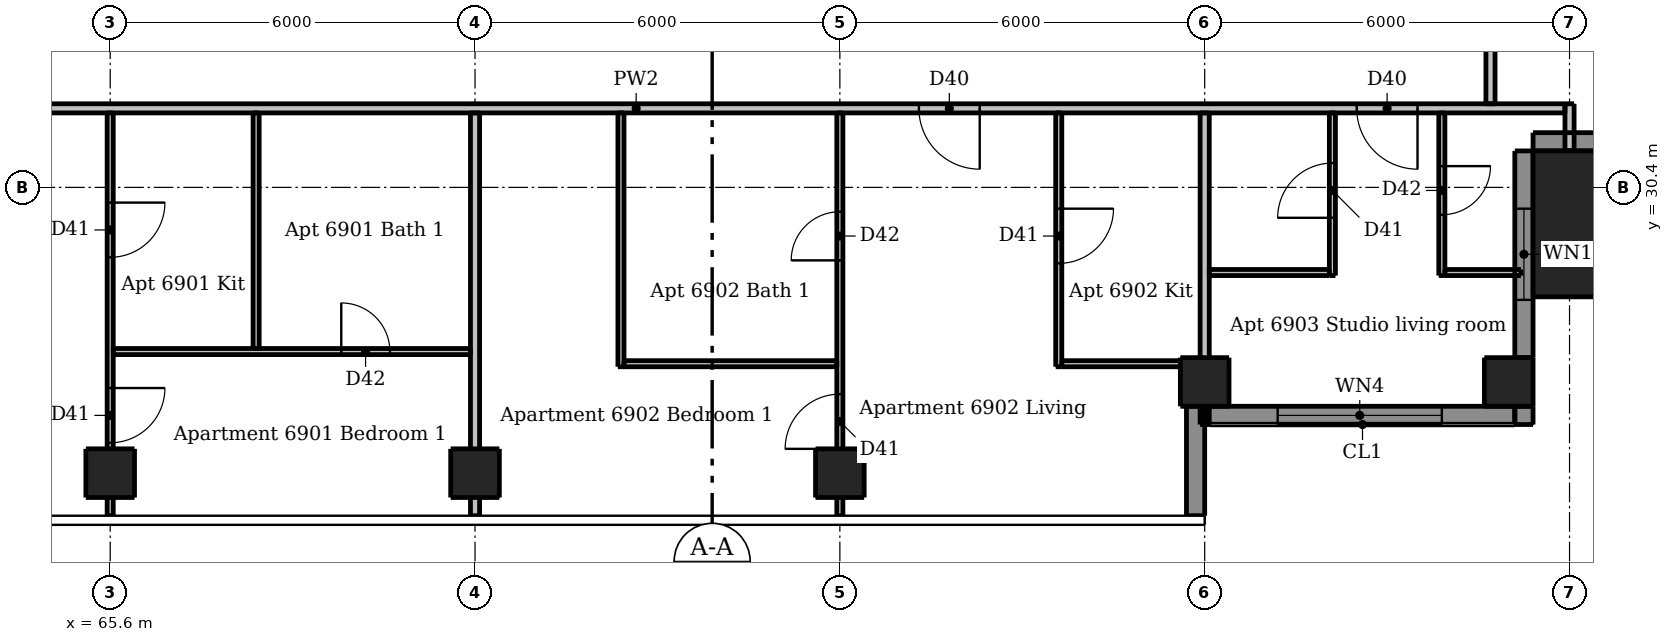
"""IFC4 building model, lengths in metres.
Left out: names, types, materials, properties, quantities, classifications, styles, units other than length and angle.
Written with IfcOpenShell. Run it as: python <this file> out.ifc"""

import sys

from ifc_helpers import new_model, si_unit, direction, frame, frame_2d, origin, origin_2d, place, context, subcontext, project, spatial, rectangle, extrude, element, fill, save


model = new_model("IFC4")
c1 = context("Model", 3, precision=1e-05, world=origin(), true_north=direction((0.0, 1.0)))
c2 = subcontext(c1, "Body", "Model", "MODEL_VIEW")
j1 = project(units=[si_unit("LENGTHUNIT", "METRE"), si_unit("PLANEANGLEUNIT", "RADIAN")], contexts=[c1])
p1 = place(None, origin())
s1 = spatial("IfcSite", under=j1, at=p1, CompositionType="ELEMENT")
p2 = place(p1, origin())
s2 = spatial("IfcBuilding", under=s1, at=p2, CompositionType="ELEMENT")
p3 = place(p2, frame((0.0, 0.0, 258.7)))
s3 = spatial("IfcBuildingStorey", under=s2, at=p3, CompositionType="ELEMENT", Elevation=258.7)
for number, where, z_axis, x_axis in (
    (1, (65.6, 25.7, 0.0), (0.0, 0.0, 1.0), (1.0, 0.0, 0.0)),
    (2, (71.6, 25.7, 0.0), (0.0, 0.0, 1.0), (1.0, 0.0, 0.0)),
    (3, (77.6, 25.7, 0.0), (0.0, 0.0, 1.0), (1.0, 0.0, 0.0)),
    (4, (83.6, 27.2, 0.0), (0.0, 0.0, 1.0), (1.0, 0.0, 0.0)),
    (5, (88.6, 27.2, 0.0), (0.0, 0.0, 1.0), (1.0, 0.0, 0.0)),
):
    element("IfcColumn", number, at=place(p3, frame(where, z_axis=z_axis, x_axis=x_axis)), inside=s3, PredefinedType="COLUMN", context=c2, shape_type="SweptSolid", body=[
        extrude(rectangle(XDim=0.8, YDim=0.8, at=origin_2d()), origin(), (0.0, 0.0, 1.0), 3.05),
    ])
p4 = place(p3, frame((90.2, 29.8, 0.0), z_axis=(0.0, 0.0, 1.0), x_axis=(1.0, 0.0, 0.0)))
e6 = element("IfcColumn", 6, at=p4, inside=s3, PredefinedType="COLUMN", context=c2, shape_type="SweptSolid", body=[
    extrude(rectangle(XDim=2.4, YDim=2.4, at=origin_2d()), origin(), (0.0, 0.0, 1.0), 3.3),
])
p5 = place(p3, frame((83.45, 25.0, 0.0), z_axis=(0.0, 0.0, 1.0), x_axis=(0.0, 1.0, 0.0)))
e7 = element("IfcWall", 7, at=p5, inside=s3, PredefinedType="SOLIDWALL", context=c2, shape_type="SweptSolid", body=[
    extrude(rectangle(XDim=1.8, YDim=0.3, at=frame_2d((0.9, 0.0))), origin(), (0.0, 0.0, 1.0), 3.05),
])
p6 = place(p3, frame((88.85, 26.5, 0.0), z_axis=(0.0, 0.0, 1.0), x_axis=(0.0, 1.0, 0.0)))
e8 = element("IfcWall", 8, at=p6, inside=s3, PredefinedType="SOLIDWALL", context=c2, shape_type="SweptSolid", body=[
    extrude(rectangle(XDim=0.3, YDim=0.3, at=frame_2d((0.15, 0.0))), origin(), (0.0, 0.0, 1.0), 3.05),
])
p7 = place(p3, frame((88.85, 27.6, 0.0), z_axis=(0.0, 0.0, 1.0), x_axis=(0.0, 1.0, 0.0)))
e9 = element("IfcWall", 9, at=p7, inside=s3, PredefinedType="SOLIDWALL", context=c2, shape_type="SweptSolid", body=[
    extrude(rectangle(XDim=3.4, YDim=0.3, at=frame_2d((1.7, 0.0))), origin(), (0.0, 0.0, 1.0), 3.05),
])
p8 = place(p7, frame((0.95, 0.0, 0.9)))
e10 = element("IfcOpeningElement", 10, at=p8, cuts=e9, PredefinedType="OPENING", context=c2, shape_type="SweptSolid", body=[
    extrude(rectangle(XDim=1.5, YDim=1.5, at=frame_2d((0.75, 0.75))), frame((0.0, 0.16, 0.0), z_axis=(0.0, -1.0, 0.0), x_axis=(1.0, 0.0, 0.0)), (0.0, 0.0, 1.0), 0.32),
])
p9 = place(p3, frame((89.0, 31.15, 0.0), z_axis=(0.0, 0.0, 1.0), x_axis=(1.0, 0.0, 0.0)))
e11 = element("IfcWall", 11, at=p9, inside=s3, PredefinedType="SOLIDWALL", context=c2, shape_type="SweptSolid", body=[
    extrude(rectangle(XDim=3.4, YDim=0.3, at=frame_2d((1.7, 0.0))), origin(), (0.0, 0.0, 1.0), 3.05),
])
p10 = place(p3, frame((83.6, 26.65, 0.0), z_axis=(0.0, 0.0, 1.0), x_axis=(1.0, 0.0, 0.0)))
e12 = element("IfcWall", 12, at=p10, inside=s3, PredefinedType="SOLIDWALL", context=c2, shape_type="SweptSolid", body=[
    extrude(rectangle(XDim=5.1, YDim=0.3, at=frame_2d((2.55, 0.0))), origin(), (0.0, 0.0, 1.0), 3.05),
])
p11 = place(p10, frame((1.2, 0.0, 0.15)))
e13 = element("IfcOpeningElement", 13, at=p11, cuts=e12, PredefinedType="OPENING", context=c2, shape_type="SweptSolid", body=[
    extrude(rectangle(XDim=2.7, YDim=2.1, at=frame_2d((1.35, 1.05))), frame((0.0, 0.16, 0.0), z_axis=(0.0, -1.0, 0.0), x_axis=(1.0, 0.0, 0.0)), (0.0, 0.0, 1.0), 0.32),
])
p12 = place(p3, frame((65.6, 31.625, 0.0), z_axis=(0.0, 0.0, 1.0), x_axis=(0.0, -1.0, 0.0)))
e14 = element("IfcWall", 14, at=p12, inside=s3, PredefinedType="PARTITIONING", context=c2, shape_type="SweptSolid", body=[
    extrude(rectangle(XDim=6.625, YDim=0.1, at=frame_2d((3.312, 0.0))), origin(), (0.0, 0.0, 1.0), 2.589),
])
p13 = place(p12, frame((1.475, 0.0, 0.0)))
e15 = element("IfcOpeningElement", 15, at=p13, cuts=e14, PredefinedType="OPENING", context=c2, shape_type="SweptSolid", body=[
    extrude(rectangle(XDim=0.9, YDim=2.1, at=frame_2d((0.45, 1.05))), frame((0.0, 0.06, 0.0), z_axis=(0.0, -1.0, 0.0), x_axis=(1.0, 0.0, 0.0)), (0.0, 0.0, 1.0), 0.12),
])
p14 = place(p12, frame((4.525, 0.0, 0.0)))
e16 = element("IfcOpeningElement", 16, at=p14, cuts=e14, PredefinedType="OPENING", context=c2, shape_type="SweptSolid", body=[
    extrude(rectangle(XDim=0.9, YDim=2.1, at=frame_2d((0.45, 1.05))), frame((0.0, 0.06, 0.0), z_axis=(0.0, -1.0, 0.0), x_axis=(1.0, 0.0, 0.0)), (0.0, 0.0, 1.0), 0.12),
])
p15 = place(p3, frame((68.0, 27.75, 0.0), z_axis=(0.0, 0.0, 1.0), x_axis=(0.0, 1.0, 0.0)))
e17 = element("IfcWall", 17, at=p15, inside=s3, PredefinedType="PARTITIONING", context=c2, shape_type="SweptSolid", body=[
    extrude(rectangle(XDim=3.875, YDim=0.1, at=frame_2d((1.938, 0.0))), origin(), (0.0, 0.0, 1.0), 3.05),
])
p16 = place(p3, frame((74.0, 27.45, 0.0), z_axis=(0.0, 0.0, 1.0), x_axis=(0.0, 1.0, 0.0)))
e18 = element("IfcWall", 18, at=p16, inside=s3, PredefinedType="PARTITIONING", context=c2, shape_type="SweptSolid", body=[
    extrude(rectangle(XDim=4.175, YDim=0.1, at=frame_2d((2.087, 0.0))), origin(), (0.0, 0.0, 1.0), 3.05),
])
p17 = place(p3, frame((77.6, 25.0, 0.0), z_axis=(0.0, 0.0, 1.0), x_axis=(0.0, 1.0, 0.0)))
e19 = element("IfcWall", 19, at=p17, inside=s3, PredefinedType="PARTITIONING", context=c2, shape_type="SweptSolid", body=[
    extrude(rectangle(XDim=6.625, YDim=0.1, at=frame_2d((3.312, 0.0))), origin(), (0.0, 0.0, 1.0), 2.589),
])
p18 = place(p17, frame((1.1, 0.0, 0.0)))
e20 = element("IfcOpeningElement", 20, at=p18, cuts=e19, PredefinedType="OPENING", context=c2, shape_type="SweptSolid", body=[
    extrude(rectangle(XDim=0.9, YDim=2.1, at=frame_2d((0.45, 1.05))), frame((0.0, 0.06, 0.0), z_axis=(0.0, -1.0, 0.0), x_axis=(1.0, 0.0, 0.0)), (0.0, 0.0, 1.0), 0.12),
])
p19 = place(p17, frame((4.2, 0.0, 0.0)))
e21 = element("IfcOpeningElement", 21, at=p19, cuts=e19, PredefinedType="OPENING", context=c2, shape_type="SweptSolid", body=[
    extrude(rectangle(XDim=0.8, YDim=2.1, at=frame_2d((0.4, 1.05))), frame((0.0, 0.06, 0.0), z_axis=(0.0, -1.0, 0.0), x_axis=(1.0, 0.0, 0.0)), (0.0, 0.0, 1.0), 0.12),
])
p20 = place(p3, frame((81.2, 31.625, 0.0), z_axis=(0.0, 0.0, 1.0), x_axis=(0.0, -1.0, 0.0)))
e22 = element("IfcWall", 22, at=p20, inside=s3, PredefinedType="PARTITIONING", context=c2, shape_type="SweptSolid", body=[
    extrude(rectangle(XDim=4.175, YDim=0.1, at=frame_2d((2.087, 0.0))), origin(), (0.0, 0.0, 1.0), 3.05),
])
p21 = place(p20, frame((1.575, 0.0, 0.0)))
e23 = element("IfcOpeningElement", 23, at=p21, cuts=e22, PredefinedType="OPENING", context=c2, shape_type="SweptSolid", body=[
    extrude(rectangle(XDim=0.9, YDim=2.1, at=frame_2d((0.45, 1.05))), frame((0.0, 0.06, 0.0), z_axis=(0.0, -1.0, 0.0), x_axis=(1.0, 0.0, 0.0)), (0.0, 0.0, 1.0), 0.12),
])
p22 = place(p3, frame((85.7, 28.95, 0.0), z_axis=(0.0, 0.0, 1.0), x_axis=(0.0, 1.0, 0.0)))
e24 = element("IfcWall", 24, at=p22, inside=s3, PredefinedType="PARTITIONING", context=c2, shape_type="SweptSolid", body=[
    extrude(rectangle(XDim=2.675, YDim=0.1, at=frame_2d((1.337, 0.0))), origin(), (0.0, 0.0, 1.0), 3.05),
])
p23 = place(p22, frame((0.95, 0.0, 0.0)))
e25 = element("IfcOpeningElement", 25, at=p23, cuts=e24, PredefinedType="OPENING", context=c2, shape_type="SweptSolid", body=[
    extrude(rectangle(XDim=0.9, YDim=2.1, at=frame_2d((0.45, 1.05))), frame((0.0, 0.06, 0.0), z_axis=(0.0, -1.0, 0.0), x_axis=(1.0, 0.0, 0.0)), (0.0, 0.0, 1.0), 0.12),
])
p24 = place(p3, frame((87.5, 31.625, 0.0), z_axis=(0.0, 0.0, 1.0), x_axis=(0.0, -1.0, 0.0)))
e26 = element("IfcWall", 26, at=p24, inside=s3, PredefinedType="PARTITIONING", context=c2, shape_type="SweptSolid", body=[
    extrude(rectangle(XDim=2.675, YDim=0.1, at=frame_2d((1.337, 0.0))), origin(), (0.0, 0.0, 1.0), 3.05),
])
p25 = place(p24, frame((0.875, 0.0, 0.0)))
e27 = element("IfcOpeningElement", 27, at=p25, cuts=e26, PredefinedType="OPENING", context=c2, shape_type="SweptSolid", body=[
    extrude(rectangle(XDim=0.8, YDim=2.1, at=frame_2d((0.4, 1.05))), frame((0.0, 0.06, 0.0), z_axis=(0.0, -1.0, 0.0), x_axis=(1.0, 0.0, 0.0)), (0.0, 0.0, 1.0), 0.12),
])
p26 = place(p3, frame((83.675, 29.0, 0.0), z_axis=(0.0, 0.0, 1.0), x_axis=(1.0, 0.0, 0.0)))
e28 = element("IfcWall", 28, at=p26, inside=s3, PredefinedType="PARTITIONING", context=c2, shape_type="SweptSolid", body=[
    extrude(rectangle(XDim=1.975, YDim=0.1, at=frame_2d((0.987, 0.0))), origin(), (0.0, 0.0, 1.0), 3.05),
])
p27 = place(p3, frame((87.55, 29.0, 0.0), z_axis=(0.0, 0.0, 1.0), x_axis=(1.0, 0.0, 0.0)))
e29 = element("IfcWall", 29, at=p27, inside=s3, PredefinedType="PARTITIONING", context=c2, shape_type="SweptSolid", body=[
    extrude(rectangle(XDim=1.25, YDim=0.1, at=frame_2d((0.625, 0.0))), origin(), (0.0, 0.0, 1.0), 3.05),
])
p28 = place(p3, frame((65.65, 27.7, 0.0), z_axis=(0.0, 0.0, 1.0), x_axis=(1.0, 0.0, 0.0)))
e30 = element("IfcWall", 30, at=p28, inside=s3, PredefinedType="PARTITIONING", context=c2, shape_type="SweptSolid", body=[
    extrude(rectangle(XDim=5.875, YDim=0.1, at=frame_2d((2.938, 0.0))), origin(), (0.0, 0.0, 1.0), 3.05),
])
p29 = place(p28, frame((3.75, 0.0, 0.0)))
e31 = element("IfcOpeningElement", 31, at=p29, cuts=e30, PredefinedType="OPENING", context=c2, shape_type="SweptSolid", body=[
    extrude(rectangle(XDim=0.8, YDim=2.1, at=frame_2d((0.4, 1.05))), frame((0.0, 0.06, 0.0), z_axis=(0.0, -1.0, 0.0), x_axis=(1.0, 0.0, 0.0)), (0.0, 0.0, 1.0), 0.12),
])
p30 = place(p3, frame((74.05, 27.5, 0.0), z_axis=(0.0, 0.0, 1.0), x_axis=(1.0, 0.0, 0.0)))
e32 = element("IfcWall", 32, at=p30, inside=s3, PredefinedType="PARTITIONING", context=c2, shape_type="SweptSolid", body=[
    extrude(rectangle(XDim=3.5, YDim=0.1, at=frame_2d((1.75, 0.0))), origin(), (0.0, 0.0, 1.0), 3.05),
])
p31 = place(p3, frame((81.25, 27.5, 0.0), z_axis=(0.0, 0.0, 1.0), x_axis=(1.0, 0.0, 0.0)))
e33 = element("IfcWall", 33, at=p31, inside=s3, PredefinedType="PARTITIONING", context=c2, shape_type="SweptSolid", body=[
    extrude(rectangle(XDim=2.275, YDim=0.1, at=frame_2d((1.137, 0.0))), origin(), (0.0, 0.0, 1.0), 3.05),
])
p32 = place(p3, frame((71.6, 25.0, 0.0), z_axis=(0.0, 0.0, 1.0), x_axis=(0.0, 1.0, 0.0)))
e34 = element("IfcWall", 34, at=p32, inside=s3, PredefinedType="PARTITIONING", context=c2, shape_type="SweptSolid", body=[
    extrude(rectangle(XDim=6.625, YDim=0.15, at=frame_2d((3.312, 0.0))), origin(), (0.0, 0.0, 1.0), 2.589),
])
p33 = place(p3, frame((83.6, 26.5, 0.0), z_axis=(0.0, 0.0, 1.0), x_axis=(0.0, 1.0, 0.0)))
e35 = element("IfcWall", 35, at=p33, inside=s3, PredefinedType="PARTITIONING", context=c2, shape_type="SweptSolid", body=[
    extrude(rectangle(XDim=5.125, YDim=0.15, at=frame_2d((2.562, 0.0))), origin(), (0.0, 0.0, 1.0), 2.647),
])
p34 = place(p3, frame((88.3, 61.175, 0.0), z_axis=(0.0, 0.0, 1.0), x_axis=(0.0, -1.0, 0.0)))
e36 = element("IfcWall", 36, at=p34, inside=s3, PredefinedType="PARTITIONING", context=c2, shape_type="SweptSolid", body=[
    extrude(rectangle(XDim=29.4, YDim=0.15, at=frame_2d((14.7, 0.0))), origin(), (0.0, 0.0, 1.0), 3.05),
])
p35 = place(p34, frame((26.625, 0.0, 0.0)))
e37 = element("IfcOpeningElement", 37, at=p35, cuts=e36, PredefinedType="OPENING", context=c2, shape_type="SweptSolid", body=[
    extrude(rectangle(XDim=1.0, YDim=2.1, at=frame_2d((0.5, 1.05))), frame((0.0, 0.085, 0.0), z_axis=(0.0, -1.0, 0.0), x_axis=(1.0, 0.0, 0.0)), (0.0, 0.0, 1.0), 0.17),
])
p36 = place(p34, frame((9.275, 0.0, 0.0)))
e38 = element("IfcOpeningElement", 38, at=p36, cuts=e36, PredefinedType="OPENING", context=c2, shape_type="SweptSolid", body=[
    extrude(rectangle(XDim=1.0, YDim=2.1, at=frame_2d((0.5, 1.05))), frame((0.0, 0.085, 0.0), z_axis=(0.0, -1.0, 0.0), x_axis=(1.0, 0.0, 0.0)), (0.0, 0.0, 1.0), 0.17),
])
p37 = place(p3, frame((89.6, 31.0, 0.0), z_axis=(0.0, 0.0, 1.0), x_axis=(0.0, 1.0, 0.0)))
e39 = element("IfcWall", 39, at=p37, inside=s3, PredefinedType="PARTITIONING", context=c2, shape_type="SweptSolid", body=[
    extrude(rectangle(XDim=0.775, YDim=0.15, at=frame_2d((0.387, 0.0))), origin(), (0.0, 0.0, 1.0), 3.05),
])
p38 = place(p3, frame((89.525, 31.7, 0.0), z_axis=(0.0, 0.0, 1.0), x_axis=(-1.0, 0.0, 0.0)))
e40 = element("IfcWall", 40, at=p38, inside=s3, PredefinedType="PARTITIONING", context=c2, shape_type="SweptSolid", body=[
    extrude(rectangle(XDim=30.55, YDim=0.15, at=frame_2d((15.275, 0.0))), origin(), (0.0, 0.0, 1.0), 3.05),
])
p39 = place(p38, frame((26.775, 0.0, 0.0)))
e41 = element("IfcOpeningElement", 41, at=p39, cuts=e40, PredefinedType="OPENING", context=c2, shape_type="SweptSolid", body=[
    extrude(rectangle(XDim=1.0, YDim=2.1, at=frame_2d((0.5, 1.05))), frame((0.0, 0.085, 0.0), z_axis=(0.0, -1.0, 0.0), x_axis=(1.0, 0.0, 0.0)), (0.0, 0.0, 1.0), 0.17),
])
p40 = place(p38, frame((9.625, 0.0, 0.0)))
e42 = element("IfcOpeningElement", 42, at=p40, cuts=e40, PredefinedType="OPENING", context=c2, shape_type="SweptSolid", body=[
    extrude(rectangle(XDim=1.0, YDim=2.1, at=frame_2d((0.5, 1.05))), frame((0.0, 0.085, 0.0), z_axis=(0.0, -1.0, 0.0), x_axis=(1.0, 0.0, 0.0)), (0.0, 0.0, 1.0), 0.17),
])
p41 = place(p38, frame((2.425, 0.0, 0.0)))
e43 = element("IfcOpeningElement", 43, at=p41, cuts=e40, PredefinedType="OPENING", context=c2, shape_type="SweptSolid", body=[
    extrude(rectangle(XDim=1.0, YDim=2.1, at=frame_2d((0.5, 1.05))), frame((0.0, 0.085, 0.0), z_axis=(0.0, -1.0, 0.0), x_axis=(1.0, 0.0, 0.0)), (0.0, 0.0, 1.0), 0.17),
])
p42 = place(p8, origin())
e44 = element("IfcWindow", 44, at=p42, inside=s3, PartitioningType="DOUBLE_PANEL_VERTICAL", PredefinedType="WINDOW", context=c2, shape_type="SweptSolid", body=[
    extrude(rectangle(XDim=1.5, YDim=1.5, at=frame_2d((0.75, 0.75))), frame((0.0, 0.03, 0.0), z_axis=(0.0, -1.0, 0.0), x_axis=(1.0, 0.0, 0.0)), (0.0, 0.0, 1.0), 0.06),
])
fill(e10, e44)
p43 = place(p11, origin())
e45 = element("IfcWindow", 45, at=p43, inside=s3, PartitioningType="DOUBLE_PANEL_VERTICAL", PredefinedType="WINDOW", context=c2, shape_type="SweptSolid", body=[
    extrude(rectangle(XDim=2.7, YDim=2.1, at=frame_2d((1.35, 1.05))), frame((0.0, 0.03, 0.0), z_axis=(0.0, -1.0, 0.0), x_axis=(1.0, 0.0, 0.0)), (0.0, 0.0, 1.0), 0.06),
])
fill(e13, e45)
p44 = place(p13, origin())
e46 = element("IfcDoor", 46, at=p44, inside=s3, OperationType="SINGLE_SWING_LEFT", PredefinedType="DOOR", context=c2, shape_type="SweptSolid", body=[
    extrude(rectangle(XDim=0.9, YDim=2.1, at=frame_2d((0.45, 1.05))), frame((0.0, 0.025, 0.0), z_axis=(0.0, -1.0, 0.0), x_axis=(1.0, 0.0, 0.0)), (0.0, 0.0, 1.0), 0.05),
])
fill(e15, e46)
p45 = place(p14, origin())
e47 = element("IfcDoor", 47, at=p45, inside=s3, OperationType="SINGLE_SWING_LEFT", PredefinedType="DOOR", context=c2, shape_type="SweptSolid", body=[
    extrude(rectangle(XDim=0.9, YDim=2.1, at=frame_2d((0.45, 1.05))), frame((0.0, 0.025, 0.0), z_axis=(0.0, -1.0, 0.0), x_axis=(1.0, 0.0, 0.0)), (0.0, 0.0, 1.0), 0.05),
])
fill(e16, e47)
p46 = place(p29, origin())
e48 = element("IfcDoor", 48, at=p46, inside=s3, OperationType="SINGLE_SWING_LEFT", PredefinedType="DOOR", context=c2, shape_type="SweptSolid", body=[
    extrude(rectangle(XDim=0.8, YDim=2.1, at=frame_2d((0.4, 1.05))), frame((0.0, 0.025, 0.0), z_axis=(0.0, -1.0, 0.0), x_axis=(1.0, 0.0, 0.0)), (0.0, 0.0, 1.0), 0.05),
])
fill(e31, e48)
p47 = place(p40, origin())
e49 = element("IfcDoor", 49, at=p47, inside=s3, OperationType="SINGLE_SWING_LEFT", PredefinedType="DOOR", context=c2, shape_type="SweptSolid", body=[
    extrude(rectangle(XDim=1.0, YDim=2.1, at=frame_2d((0.5, 1.05))), frame((0.0, 0.025, 0.0), z_axis=(0.0, -1.0, 0.0), x_axis=(1.0, 0.0, 0.0)), (0.0, 0.0, 1.0), 0.05),
])
fill(e42, e49)
p48 = place(p21, origin())
e50 = element("IfcDoor", 50, at=p48, inside=s3, OperationType="SINGLE_SWING_LEFT", PredefinedType="DOOR", context=c2, shape_type="SweptSolid", body=[
    extrude(rectangle(XDim=0.9, YDim=2.1, at=frame_2d((0.45, 1.05))), frame((0.0, 0.025, 0.0), z_axis=(0.0, -1.0, 0.0), x_axis=(1.0, 0.0, 0.0)), (0.0, 0.0, 1.0), 0.05),
])
fill(e23, e50)
p49 = place(p18, origin())
e51 = element("IfcDoor", 51, at=p49, inside=s3, OperationType="SINGLE_SWING_LEFT", PredefinedType="DOOR", context=c2, shape_type="SweptSolid", body=[
    extrude(rectangle(XDim=0.9, YDim=2.1, at=frame_2d((0.45, 1.05))), frame((0.0, 0.025, 0.0), z_axis=(0.0, -1.0, 0.0), x_axis=(1.0, 0.0, 0.0)), (0.0, 0.0, 1.0), 0.05),
])
fill(e20, e51)
p50 = place(p19, origin())
e52 = element("IfcDoor", 52, at=p50, inside=s3, OperationType="SINGLE_SWING_LEFT", PredefinedType="DOOR", context=c2, shape_type="SweptSolid", body=[
    extrude(rectangle(XDim=0.8, YDim=2.1, at=frame_2d((0.4, 1.05))), frame((0.0, 0.025, 0.0), z_axis=(0.0, -1.0, 0.0), x_axis=(1.0, 0.0, 0.0)), (0.0, 0.0, 1.0), 0.05),
])
fill(e21, e52)
p51 = place(p41, origin())
e53 = element("IfcDoor", 53, at=p51, inside=s3, OperationType="SINGLE_SWING_LEFT", PredefinedType="DOOR", context=c2, shape_type="SweptSolid", body=[
    extrude(rectangle(XDim=1.0, YDim=2.1, at=frame_2d((0.5, 1.05))), frame((0.0, 0.025, 0.0), z_axis=(0.0, -1.0, 0.0), x_axis=(1.0, 0.0, 0.0)), (0.0, 0.0, 1.0), 0.05),
])
fill(e43, e53)
p52 = place(p23, origin())
e54 = element("IfcDoor", 54, at=p52, inside=s3, OperationType="SINGLE_SWING_LEFT", PredefinedType="DOOR", context=c2, shape_type="SweptSolid", body=[
    extrude(rectangle(XDim=0.9, YDim=2.1, at=frame_2d((0.45, 1.05))), frame((0.0, 0.025, 0.0), z_axis=(0.0, -1.0, 0.0), x_axis=(1.0, 0.0, 0.0)), (0.0, 0.0, 1.0), 0.05),
])
fill(e25, e54)
p53 = place(p25, origin())
e55 = element("IfcDoor", 55, at=p53, inside=s3, OperationType="SINGLE_SWING_LEFT", PredefinedType="DOOR", context=c2, shape_type="SweptSolid", body=[
    extrude(rectangle(XDim=0.8, YDim=2.1, at=frame_2d((0.4, 1.05))), frame((0.0, 0.025, 0.0), z_axis=(0.0, -1.0, 0.0), x_axis=(1.0, 0.0, 0.0)), (0.0, 0.0, 1.0), 0.05),
])
fill(e27, e55)
save(model, sys.argv[1])
